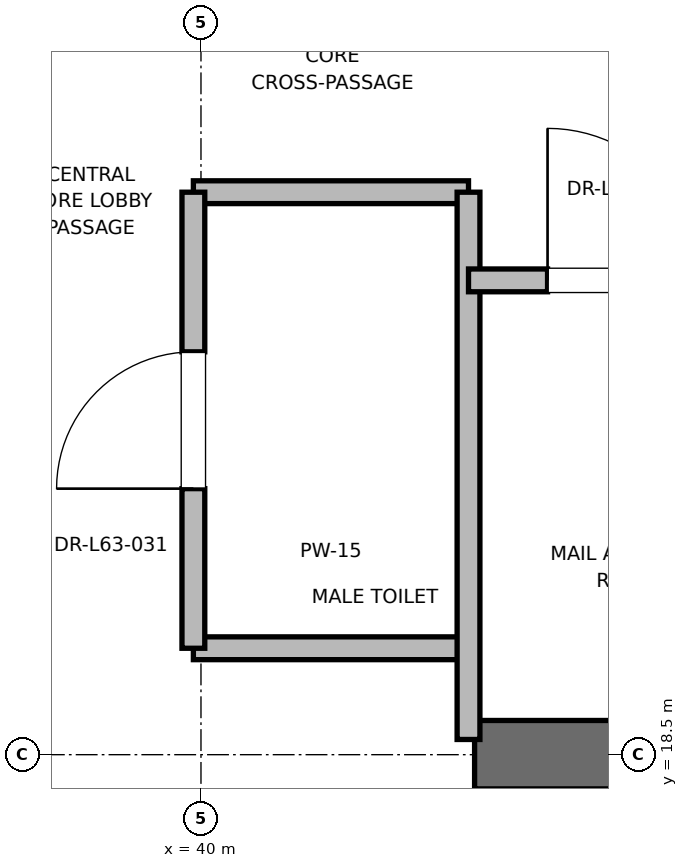
"""IFC4 building model, lengths in metres.
Left out: names, types, materials, properties, quantities, classifications, styles, units other than length and angle.
Written with IfcOpenShell. Run it as: python <this file> out.ifc"""

import sys

from ifc_helpers import new_model, si_unit, direction, frame, frame_2d, origin, place, context, subcontext, project, spatial, rectangle, extrude, element, fill, save


model = new_model("IFC4")
c1 = context("Model", 3, precision=1e-05, world=origin(), true_north=direction((0.0, 1.0)))
c2 = subcontext(c1, "Body", "Model", "MODEL_VIEW")
j1 = project(units=[si_unit("LENGTHUNIT", "METRE"), si_unit("PLANEANGLEUNIT", "RADIAN")], contexts=[c1])
p1 = place(None, origin())
s1 = spatial("IfcSite", under=j1, at=p1, CompositionType="ELEMENT")
p2 = place(p1, origin())
s2 = spatial("IfcBuilding", under=s1, at=p2, CompositionType="ELEMENT")
p3 = place(p2, frame((0.0, 0.0, 271.2)))
s3 = spatial("IfcBuildingStorey", under=s2, at=p3, CompositionType="ELEMENT", Elevation=271.2)
p4 = place(p3, frame((41.8, 18.5, 0.0), z_axis=(0.0, 0.0, 1.0), x_axis=(1.0, 0.0, 0.0)))
e1 = element("IfcWall", 1, at=p4, inside=s3, PredefinedType="SHEAR", context=c2, shape_type="SweptSolid", body=[
    extrude(rectangle(XDim=9.2, YDim=0.45, at=frame_2d((4.6, 0.0))), origin(), (0.0, 0.0, 1.0), 3.785),
])
for number, where, z_axis, x_axis in (
    (2, (39.95, 19.2, 0.0), (0.0, 0.0, 1.0), (1.0, 0.0, 0.0)),
    (3, (39.95, 22.2, 0.0), (0.0, 0.0, 1.0), (1.0, 0.0, 0.0)),
):
    element("IfcWall", number, at=place(p3, frame(where, z_axis=z_axis, x_axis=x_axis)), inside=s3, PredefinedType="PARTITIONING", context=c2, shape_type="SweptSolid", body=[
        extrude(rectangle(XDim=1.81, YDim=0.15, at=frame_2d((0.905, 0.0))), origin(), (0.0, 0.0, 1.0), 2.85),
    ])
p5 = place(p3, frame((41.76, 18.6, 0.0), z_axis=(0.0, 0.0, 1.0), x_axis=(0.0, 1.0, 0.0)))
e4 = element("IfcWall", 4, at=p5, inside=s3, PredefinedType="PARTITIONING", context=c2, shape_type="SweptSolid", body=[
    extrude(rectangle(XDim=3.6, YDim=0.15, at=frame_2d((1.8, 0.0))), origin(), (0.0, 0.0, 1.0), 2.85),
])
p6 = place(p3, frame((39.95, 19.2, 0.0), z_axis=(0.0, 0.0, 1.0), x_axis=(0.0, 1.0, 0.0)))
e5 = element("IfcWall", 5, at=p6, inside=s3, PredefinedType="PARTITIONING", context=c2, shape_type="SweptSolid", body=[
    extrude(rectangle(XDim=3.0, YDim=0.15, at=frame_2d((1.5, 0.0))), origin(), (0.0, 0.0, 1.0), 2.85),
])
p7 = place(p6, frame((1.05, 0.0, 0.0)))
e6 = element("IfcOpeningElement", 6, at=p7, cuts=e5, PredefinedType="OPENING", context=c2, shape_type="SweptSolid", body=[
    extrude(rectangle(XDim=0.9, YDim=2.1, at=frame_2d((0.45, 1.05))), frame((0.0, 0.075, 0.0), z_axis=(0.0, -1.0, 0.0), x_axis=(1.0, 0.0, 0.0)), (0.0, 0.0, 1.0), 0.15),
])
p8 = place(p3, frame((41.76, 21.62, 0.0), z_axis=(0.0, 0.0, 1.0), x_axis=(1.0, 0.0, 0.0)))
e7 = element("IfcWall", 7, at=p8, inside=s3, PredefinedType="PARTITIONING", context=c2, shape_type="SweptSolid", body=[
    extrude(rectangle(XDim=2.04, YDim=0.15, at=frame_2d((1.02, 0.0))), origin(), (0.0, 0.0, 1.0), 2.85),
])
p9 = place(p8, frame((0.52, 0.0, 0.0)))
e8 = element("IfcOpeningElement", 8, at=p9, cuts=e7, PredefinedType="OPENING", context=c2, shape_type="SweptSolid", body=[
    extrude(rectangle(XDim=1.0, YDim=2.15, at=frame_2d((0.5, 1.075))), frame((0.0, 0.075, 0.0), z_axis=(0.0, -1.0, 0.0), x_axis=(1.0, 0.0, 0.0)), (0.0, 0.0, 1.0), 0.15),
])
p10 = place(p7, origin())
e9 = element("IfcDoor", 9, at=p10, inside=s3, OperationType="SINGLE_SWING_LEFT", PredefinedType="DOOR", context=c2, shape_type="SweptSolid", body=[
    extrude(rectangle(XDim=0.9, YDim=2.1, at=frame_2d((0.45, 1.05))), frame((0.0, 0.025, 0.0), z_axis=(0.0, -1.0, 0.0), x_axis=(1.0, 0.0, 0.0)), (0.0, 0.0, 1.0), 0.05),
])
fill(e6, e9)
p11 = place(p9, origin())
e10 = element("IfcDoor", 10, at=p11, inside=s3, OperationType="SINGLE_SWING_LEFT", PredefinedType="DOOR", context=c2, shape_type="SweptSolid", body=[
    extrude(rectangle(XDim=1.0, YDim=2.15, at=frame_2d((0.5, 1.075))), frame((0.0, 0.025, 0.0), z_axis=(0.0, -1.0, 0.0), x_axis=(1.0, 0.0, 0.0)), (0.0, 0.0, 1.0), 0.05),
])
fill(e8, e10)
save(model, sys.argv[1])
